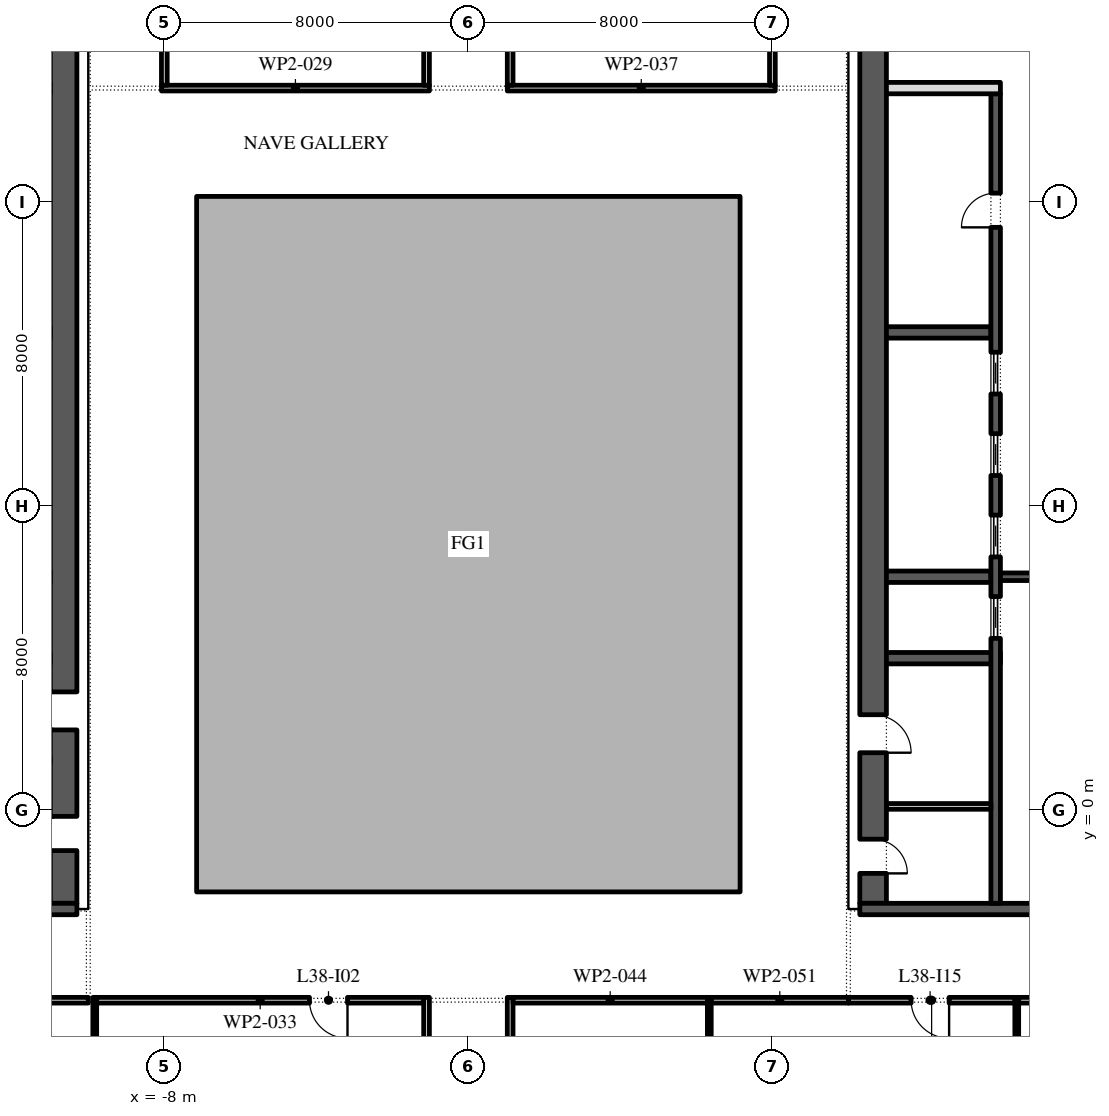
"""IFC4 building model, lengths in metres.
Left out: names, types, materials, properties, quantities, classifications, styles, units other than length and angle.
Written with IfcOpenShell. Run it as: python <this file> out.ifc"""

import sys

from ifc_helpers import new_model, si_unit, direction, frame, frame_2d, origin, place, context, subcontext, project, spatial, polyline, rectangle, outline, extrude, element, fill, save


model = new_model("IFC4")
c1 = context("Model", 3, precision=1e-05, world=origin(), true_north=direction((0.0, 1.0)))
c2 = subcontext(c1, "Body", "Model", "MODEL_VIEW")
j1 = project(units=[si_unit("LENGTHUNIT", "METRE"), si_unit("PLANEANGLEUNIT", "RADIAN")], contexts=[c1])
p1 = place(None, origin())
s1 = spatial("IfcSite", under=j1, at=p1, CompositionType="ELEMENT")
p2 = place(p1, origin())
s2 = spatial("IfcBuilding", under=s1, at=p2, CompositionType="ELEMENT")
p3 = place(p2, frame((0.0, 0.0, 175.8)))
s3 = spatial("IfcBuildingStorey", under=s2, at=p3, CompositionType="ELEMENT", Elevation=175.8)
p4 = place(p3, origin())
e1 = element("IfcWall", 1, at=p4, inside=s3, PredefinedType="STANDARD", context=c2, shape_type="SweptSolid", body=[
    extrude(outline(polyline([(-7.15, -2.15), (7.15, -2.15), (7.15, 16.15), (-7.15, 16.15), (-7.15, -2.15)]), holes=[polyline([(-7.0, -2.0), (-7.0, 16.0), (7.0, 16.0), (7.0, -2.0), (-7.0, -2.0)])]), origin(), (0.0, 0.0, 1.0), 4.0),
])
p5 = place(p3, frame((-10.65, -2.45, 0.0), z_axis=(0.0, 0.0, 1.0), x_axis=(0.0, 1.0, 0.0)))
e2 = element("IfcWall", 2, at=p5, inside=s3, PredefinedType="SHEAR", context=c2, shape_type="SweptSolid", body=[
    extrude(rectangle(XDim=27.9, YDim=0.7, at=frame_2d((13.95, 0.0))), origin(), (0.0, 0.0, 1.0), 4.0),
])
p6 = place(p5, frame((23.65, 0.0, 0.0)))
e3 = element("IfcOpeningElement", 3, at=p6, cuts=e2, PredefinedType="OPENING", context=c2, shape_type="SweptSolid", body=[
    extrude(rectangle(XDim=2.4, YDim=2.1, at=frame_2d((1.2, 1.05))), frame((0.0, 0.36, 0.0), z_axis=(0.0, -1.0, 0.0), x_axis=(1.0, 0.0, 0.0)), (0.0, 0.0, 1.0), 0.72),
])
p7 = place(p5, frame((1.387, 0.0, 0.0)))
e4 = element("IfcOpeningElement", 4, at=p7, cuts=e2, PredefinedType="OPENING", context=c2, shape_type="SweptSolid", body=[
    extrude(rectangle(XDim=0.9, YDim=2.1, at=frame_2d((0.45, 1.05))), frame((0.0, 0.36, 0.0), z_axis=(0.0, -1.0, 0.0), x_axis=(1.0, 0.0, 0.0)), (0.0, 0.0, 1.0), 0.72),
])
p8 = place(p5, frame((4.562, 0.0, 0.0)))
e5 = element("IfcOpeningElement", 5, at=p8, cuts=e2, PredefinedType="OPENING", context=c2, shape_type="SweptSolid", body=[
    extrude(rectangle(XDim=1.0, YDim=2.1, at=frame_2d((0.5, 1.05))), frame((0.0, 0.36, 0.0), z_axis=(0.0, -1.0, 0.0), x_axis=(1.0, 0.0, 0.0)), (0.0, 0.0, 1.0), 0.72),
])
p9 = place(p3, frame((-21.7, -2.6, 0.0), z_axis=(0.0, 0.0, 1.0), x_axis=(1.0, 0.0, 0.0)))
e6 = element("IfcWall", 6, at=p9, inside=s3, PredefinedType="SHEAR", context=c2, shape_type="SweptSolid", body=[
    extrude(rectangle(XDim=11.4, YDim=0.3, at=frame_2d((5.7, 0.0))), origin(), (0.0, 0.0, 1.0), 4.0),
])
p10 = place(p3, frame((10.65, -2.45, 0.0), z_axis=(0.0, 0.0, 1.0), x_axis=(0.0, 1.0, 0.0)))
e7 = element("IfcWall", 7, at=p10, inside=s3, PredefinedType="SHEAR", context=c2, shape_type="SweptSolid", body=[
    extrude(rectangle(XDim=27.9, YDim=0.7, at=frame_2d((13.95, 0.0))), origin(), (0.0, 0.0, 1.0), 4.0),
])
p11 = place(p10, frame((23.65, 0.0, 0.0)))
e8 = element("IfcOpeningElement", 8, at=p11, cuts=e7, PredefinedType="OPENING", context=c2, shape_type="SweptSolid", body=[
    extrude(rectangle(XDim=2.4, YDim=2.1, at=frame_2d((1.2, 1.05))), frame((0.0, 0.36, 0.0), z_axis=(0.0, -1.0, 0.0), x_axis=(1.0, 0.0, 0.0)), (0.0, 0.0, 1.0), 0.72),
])
p12 = place(p10, frame((0.788, 0.0, 0.0)))
e9 = element("IfcOpeningElement", 9, at=p12, cuts=e7, PredefinedType="OPENING", context=c2, shape_type="SweptSolid", body=[
    extrude(rectangle(XDim=0.9, YDim=2.1, at=frame_2d((0.45, 1.05))), frame((0.0, 0.36, 0.0), z_axis=(0.0, -1.0, 0.0), x_axis=(1.0, 0.0, 0.0)), (0.0, 0.0, 1.0), 0.72),
])
p13 = place(p10, frame((3.962, 0.0, 0.0)))
e10 = element("IfcOpeningElement", 10, at=p13, cuts=e7, PredefinedType="OPENING", context=c2, shape_type="SweptSolid", body=[
    extrude(rectangle(XDim=1.0, YDim=2.1, at=frame_2d((0.5, 1.05))), frame((0.0, 0.36, 0.0), z_axis=(0.0, -1.0, 0.0), x_axis=(1.0, 0.0, 0.0)), (0.0, 0.0, 1.0), 0.72),
])
p14 = place(p3, frame((10.3, -2.6, 0.0), z_axis=(0.0, 0.0, 1.0), x_axis=(1.0, 0.0, 0.0)))
e11 = element("IfcWall", 11, at=p14, inside=s3, PredefinedType="SHEAR", context=c2, shape_type="SweptSolid", body=[
    extrude(rectangle(XDim=11.4, YDim=0.3, at=frame_2d((5.7, 0.0))), origin(), (0.0, 0.0, 1.0), 4.0),
])
p15 = place(p3, frame((11.0, 4.0, 0.0), z_axis=(0.0, 0.0, 1.0), x_axis=(1.0, 0.0, 0.0)))
e12 = element("IfcWall", 12, at=p15, inside=s3, PredefinedType="SHEAR", context=c2, shape_type="SweptSolid", body=[
    extrude(rectangle(XDim=3.0, YDim=0.3, at=frame_2d((1.5, 0.0))), origin(), (0.0, 0.0, 1.0), 4.0),
])
for number, where, z_axis, x_axis in (
    (13, (11.0, 6.143, 0.0), (0.0, 0.0, 1.0), (1.0, 0.0, 0.0)),
    (14, (11.0, 12.571, 0.0), (0.0, 0.0, 1.0), (1.0, 0.0, 0.0)),
):
    element("IfcWall", number, at=place(p3, frame(where, z_axis=z_axis, x_axis=x_axis)), inside=s3, PredefinedType="SHEAR", context=c2, shape_type="SweptSolid", body=[
        extrude(rectangle(XDim=2.75, YDim=0.3, at=frame_2d((1.375, 0.0))), origin(), (0.0, 0.0, 1.0), 4.0),
    ])
p16 = place(p3, frame((13.875, -2.45, 0.0), z_axis=(0.0, 0.0, 1.0), x_axis=(0.0, 1.0, 0.0)))
e15 = element("IfcWall", 15, at=p16, inside=s3, PredefinedType="SHEAR", context=c2, shape_type="SweptSolid", body=[
    extrude(rectangle(XDim=21.3, YDim=0.25, at=frame_2d((10.65, 0.0))), origin(), (0.0, 0.0, 1.0), 4.0),
])
p17 = place(p16, frame((17.786, 0.0, 0.0)))
e16 = element("IfcOpeningElement", 16, at=p17, cuts=e15, PredefinedType="OPENING", context=c2, shape_type="SweptSolid", body=[
    extrude(rectangle(XDim=0.9, YDim=2.1, at=frame_2d((0.45, 1.05))), frame((0.0, 0.135, 0.0), z_axis=(0.0, -1.0, 0.0), x_axis=(1.0, 0.0, 0.0)), (0.0, 0.0, 1.0), 0.27),
])
p18 = place(p16, frame((6.971, 0.0, 0.0)))
e17 = element("IfcOpeningElement", 17, at=p18, cuts=e15, PredefinedType="OPENING", context=c2, shape_type="SweptSolid", body=[
    extrude(rectangle(XDim=1.1, YDim=2.1, at=frame_2d((0.55, 1.05))), frame((0.0, 0.135, 0.0), z_axis=(0.0, -1.0, 0.0), x_axis=(1.0, 0.0, 0.0)), (0.0, 0.0, 1.0), 0.27),
])
p19 = place(p16, frame((9.114, 0.0, 0.0)))
e18 = element("IfcOpeningElement", 18, at=p19, cuts=e15, PredefinedType="OPENING", context=c2, shape_type="SweptSolid", body=[
    extrude(rectangle(XDim=1.1, YDim=2.1, at=frame_2d((0.55, 1.05))), frame((0.0, 0.135, 0.0), z_axis=(0.0, -1.0, 0.0), x_axis=(1.0, 0.0, 0.0)), (0.0, 0.0, 1.0), 0.27),
])
p20 = place(p16, frame((11.257, 0.0, 0.0)))
e19 = element("IfcOpeningElement", 19, at=p20, cuts=e15, PredefinedType="OPENING", context=c2, shape_type="SweptSolid", body=[
    extrude(rectangle(XDim=1.1, YDim=2.1, at=frame_2d((0.55, 1.05))), frame((0.0, 0.135, 0.0), z_axis=(0.0, -1.0, 0.0), x_axis=(1.0, 0.0, 0.0)), (0.0, 0.0, 1.0), 0.27),
])
p21 = place(p16, frame((13.4, 0.0, 0.0)))
e20 = element("IfcOpeningElement", 20, at=p21, cuts=e15, PredefinedType="OPENING", context=c2, shape_type="SweptSolid", body=[
    extrude(rectangle(XDim=1.1, YDim=2.1, at=frame_2d((0.55, 1.05))), frame((0.0, 0.135, 0.0), z_axis=(0.0, -1.0, 0.0), x_axis=(1.0, 0.0, 0.0)), (0.0, 0.0, 1.0), 0.27),
])
p22 = place(p3, frame((11.0, 19.0, 0.0), z_axis=(0.0, 0.0, 1.0), x_axis=(1.0, 0.0, 0.0)))
e21 = element("IfcWall", 21, at=p22, inside=s3, PredefinedType="PARTITIONING", context=c2, shape_type="SweptSolid", body=[
    extrude(rectangle(XDim=3.0, YDim=0.3, at=frame_2d((1.5, 0.0))), origin(), (0.0, 0.0, 1.0), 4.0),
])
p23 = place(p3, frame((14.0, 6.143, 0.0), z_axis=(0.0, 0.0, 1.0), x_axis=(1.0, 0.0, 0.0)))
e22 = element("IfcWall", 22, at=p23, inside=s3, PredefinedType="SHEAR", context=c2, shape_type="SweptSolid", body=[
    extrude(rectangle(XDim=4.0, YDim=0.2, at=frame_2d((2.0, 0.0))), origin(), (0.0, 0.0, 1.0), 4.0),
])
p24 = place(p23, frame((1.4, 0.0, 0.0)))
e23 = element("IfcOpeningElement", 23, at=p24, cuts=e22, PredefinedType="OPENING", context=c2, shape_type="SweptSolid", body=[
    extrude(rectangle(XDim=1.2, YDim=2.1, at=frame_2d((0.6, 1.05))), frame((0.0, 0.11, 0.0), z_axis=(0.0, -1.0, 0.0), x_axis=(1.0, 0.0, 0.0)), (0.0, 0.0, 1.0), 0.22),
])
p25 = place(p3, frame((11.0, 0.1, 0.0), z_axis=(0.0, 0.0, 1.0), x_axis=(1.0, 0.0, 0.0)))
e24 = element("IfcWall", 24, at=p25, inside=s3, PredefinedType="PARTITIONING", context=c2, shape_type="SweptSolid", body=[
    extrude(rectangle(XDim=2.75, YDim=0.15, at=frame_2d((1.375, 0.0))), origin(), (0.0, 0.0, 1.0), 4.0),
])
p26 = place(p3, frame((-10.0, -5.0, 0.0), z_axis=(0.0, 0.0, 1.0), x_axis=(-1.0, 0.0, 0.0)))
e25 = element("IfcWall", 25, at=p26, inside=s3, PredefinedType="PARTITIONING", context=c2, shape_type="SweptSolid", body=[
    extrude(rectangle(XDim=13.925, YDim=0.15, at=frame_2d((6.962, 0.0))), origin(), (0.0, 0.0, 1.0), 4.0),
])
p27 = place(p26, frame((7.85, 0.0, 0.0)))
e26 = element("IfcOpeningElement", 26, at=p27, cuts=e25, PredefinedType="OPENING", context=c2, shape_type="SweptSolid", body=[
    extrude(rectangle(XDim=1.0, YDim=2.1, at=frame_2d((0.5, 1.05))), frame((0.0, 0.085, 0.0), z_axis=(0.0, -1.0, 0.0), x_axis=(1.0, 0.0, 0.0)), (0.0, 0.0, 1.0), 0.17),
])
p28 = place(p3, frame((-9.83, -11.12, 0.0), z_axis=(0.0, 0.0, 1.0), x_axis=(0.0, 1.0, 0.0)))
e27 = element("IfcWall", 27, at=p28, inside=s3, PredefinedType="PARTITIONING", context=c2, shape_type="SweptSolid", body=[
    extrude(rectangle(XDim=6.195, YDim=0.1, at=frame_2d((3.098, 0.0))), origin(), (0.0, 0.0, 1.0), 4.0),
])
p29 = place(p3, frame((-8.075, 19.0, 0.0), z_axis=(0.0, 0.0, 1.0), x_axis=(1.0, 0.0, 0.0)))
e28 = element("IfcWall", 28, at=p29, inside=s3, PredefinedType="PARTITIONING", context=c2, shape_type="SweptSolid", body=[
    extrude(rectangle(XDim=7.05, YDim=0.15, at=frame_2d((3.525, 0.0))), origin(), (0.0, 0.0, 1.0), 4.0),
])
p30 = place(p3, frame((-8.0, 27.325, 0.0), z_axis=(0.0, 0.0, 1.0), x_axis=(0.0, -1.0, 0.0)))
e29 = element("IfcWall", 29, at=p30, inside=s3, PredefinedType="PARTITIONING", context=c2, shape_type="SweptSolid", body=[
    extrude(rectangle(XDim=8.25, YDim=0.15, at=frame_2d((4.125, 0.0))), origin(), (0.0, 0.0, 1.0), 4.0),
])
p31 = place(p3, frame((-1.1, -11.12, 0.0), z_axis=(0.0, 0.0, 1.0), x_axis=(0.0, 1.0, 0.0)))
e30 = element("IfcWall", 30, at=p31, inside=s3, PredefinedType="PARTITIONING", context=c2, shape_type="SweptSolid", body=[
    extrude(rectangle(XDim=6.195, YDim=0.15, at=frame_2d((3.098, 0.0))), origin(), (0.0, 0.0, 1.0), 4.0),
])
p32 = place(p3, frame((-1.175, -5.0, 0.0), z_axis=(0.0, 0.0, 1.0), x_axis=(-1.0, 0.0, 0.0)))
e31 = element("IfcWall", 31, at=p32, inside=s3, PredefinedType="PARTITIONING", context=c2, shape_type="SweptSolid", body=[
    extrude(rectangle(XDim=8.605, YDim=0.15, at=frame_2d((4.302, 0.0))), origin(), (0.0, 0.0, 1.0), 4.0),
])
p33 = place(p32, frame((2.005, 0.0, 0.0)))
e32 = element("IfcOpeningElement", 32, at=p33, cuts=e31, PredefinedType="OPENING", context=c2, shape_type="SweptSolid", body=[
    extrude(rectangle(XDim=1.0, YDim=2.1, at=frame_2d((0.5, 1.05))), frame((0.0, 0.085, 0.0), z_axis=(0.0, -1.0, 0.0), x_axis=(1.0, 0.0, 0.0)), (0.0, 0.0, 1.0), 0.17),
])
p34 = place(p3, frame((-1.1, 19.075, 0.0), z_axis=(0.0, 0.0, 1.0), x_axis=(0.0, 1.0, 0.0)))
e33 = element("IfcWall", 33, at=p34, inside=s3, PredefinedType="PARTITIONING", context=c2, shape_type="SweptSolid", body=[
    extrude(rectangle(XDim=11.295, YDim=0.15, at=frame_2d((5.647, 0.0))), origin(), (0.0, 0.0, 1.0), 4.0),
])
p35 = place(p34, frame((6.195, 0.0, 0.0)))
e34 = element("IfcOpeningElement", 34, at=p35, cuts=e33, PredefinedType="OPENING", context=c2, shape_type="SweptSolid", body=[
    extrude(rectangle(XDim=1.0, YDim=2.1, at=frame_2d((0.5, 1.05))), frame((0.0, 0.085, 0.0), z_axis=(0.0, -1.0, 0.0), x_axis=(1.0, 0.0, 0.0)), (0.0, 0.0, 1.0), 0.17),
])
p36 = place(p3, frame((1.1, -4.925, 0.0), z_axis=(0.0, 0.0, 1.0), x_axis=(0.0, -1.0, 0.0)))
e35 = element("IfcWall", 35, at=p36, inside=s3, PredefinedType="PARTITIONING", context=c2, shape_type="SweptSolid", body=[
    extrude(rectangle(XDim=11.345, YDim=0.15, at=frame_2d((5.672, 0.0))), origin(), (0.0, 0.0, 1.0), 4.0),
])
p37 = place(p36, frame((7.675, 0.0, 0.0)))
e36 = element("IfcOpeningElement", 36, at=p37, cuts=e35, PredefinedType="OPENING", context=c2, shape_type="SweptSolid", body=[
    extrude(rectangle(XDim=1.0, YDim=2.1, at=frame_2d((0.5, 1.05))), frame((0.0, 0.085, 0.0), z_axis=(0.0, -1.0, 0.0), x_axis=(1.0, 0.0, 0.0)), (0.0, 0.0, 1.0), 0.17),
])
p38 = place(p3, frame((1.025, 19.0, 0.0), z_axis=(0.0, 0.0, 1.0), x_axis=(1.0, 0.0, 0.0)))
e37 = element("IfcWall", 37, at=p38, inside=s3, PredefinedType="PARTITIONING", context=c2, shape_type="SweptSolid", body=[
    extrude(rectangle(XDim=7.05, YDim=0.15, at=frame_2d((3.525, 0.0))), origin(), (0.0, 0.0, 1.0), 4.0),
])
p39 = place(p3, frame((1.1, 30.47, 0.0), z_axis=(0.0, 0.0, 1.0), x_axis=(0.0, -1.0, 0.0)))
e38 = element("IfcWall", 38, at=p39, inside=s3, PredefinedType="PARTITIONING", context=c2, shape_type="SweptSolid", body=[
    extrude(rectangle(XDim=11.395, YDim=0.15, at=frame_2d((5.698, 0.0))), origin(), (0.0, 0.0, 1.0), 4.0),
])
p40 = place(p39, frame((4.07, 0.0, 0.0)))
e39 = element("IfcOpeningElement", 39, at=p40, cuts=e38, PredefinedType="OPENING", context=c2, shape_type="SweptSolid", body=[
    extrude(rectangle(XDim=1.0, YDim=2.1, at=frame_2d((0.5, 1.05))), frame((0.0, 0.085, 0.0), z_axis=(0.0, -1.0, 0.0), x_axis=(1.0, 0.0, 0.0)), (0.0, 0.0, 1.0), 0.17),
])
p41 = place(p3, frame((6.34, -15.061, 0.0), z_axis=(0.0, 0.0, 1.0), x_axis=(0.0, 1.0, 0.0)))
e40 = element("IfcWall", 40, at=p41, inside=s3, PredefinedType="PARTITIONING", context=c2, shape_type="SweptSolid", body=[
    extrude(rectangle(XDim=10.136, YDim=0.1, at=frame_2d((5.068, 0.0))), origin(), (0.0, 0.0, 1.0), 4.0),
])
p42 = place(p3, frame((6.29, -5.0, 0.0), z_axis=(0.0, 0.0, 1.0), x_axis=(-1.0, 0.0, 0.0)))
e41 = element("IfcWall", 41, at=p42, inside=s3, PredefinedType="PARTITIONING", context=c2, shape_type="SweptSolid", body=[
    extrude(rectangle(XDim=5.115, YDim=0.15, at=frame_2d((2.558, 0.0))), origin(), (0.0, 0.0, 1.0), 4.0),
])
p43 = place(p3, frame((8.0, 19.075, 0.0), z_axis=(0.0, 0.0, 1.0), x_axis=(0.0, 1.0, 0.0)))
e42 = element("IfcWall", 42, at=p43, inside=s3, PredefinedType="PARTITIONING", context=c2, shape_type="SweptSolid", body=[
    extrude(rectangle(XDim=8.4, YDim=0.15, at=frame_2d((4.2, 0.0))), origin(), (0.0, 0.0, 1.0), 4.0),
])
p44 = place(p3, frame((10.0, -5.0, 0.0), z_axis=(0.0, 0.0, 1.0), x_axis=(-1.0, 0.0, 0.0)))
e43 = element("IfcWall", 43, at=p44, inside=s3, PredefinedType="PARTITIONING", context=c2, shape_type="SweptSolid", body=[
    extrude(rectangle(XDim=3.61, YDim=0.15, at=frame_2d((1.805, 0.0))), origin(), (0.0, 0.0, 1.0), 4.0),
])
p45 = place(p3, frame((14.43, -13.193, 0.0), z_axis=(0.0, 0.0, 1.0), x_axis=(0.0, 1.0, 0.0)))
e44 = element("IfcWall", 44, at=p45, inside=s3, PredefinedType="PARTITIONING", context=c2, shape_type="SweptSolid", body=[
    extrude(rectangle(XDim=8.268, YDim=0.1, at=frame_2d((4.134, 0.0))), origin(), (0.0, 0.0, 1.0), 4.0),
])
p46 = place(p3, frame((14.38, -5.0, 0.0), z_axis=(0.0, 0.0, 1.0), x_axis=(-1.0, 0.0, 0.0)))
e45 = element("IfcWall", 45, at=p46, inside=s3, PredefinedType="PARTITIONING", context=c2, shape_type="SweptSolid", body=[
    extrude(rectangle(XDim=4.38, YDim=0.15, at=frame_2d((2.19, 0.0))), origin(), (0.0, 0.0, 1.0), 4.0),
])
p47 = place(p46, frame((1.73, 0.0, 0.0)))
e46 = element("IfcOpeningElement", 46, at=p47, cuts=e45, PredefinedType="OPENING", context=c2, shape_type="SweptSolid", body=[
    extrude(rectangle(XDim=1.0, YDim=2.1, at=frame_2d((0.5, 1.05))), frame((0.0, 0.085, 0.0), z_axis=(0.0, -1.0, 0.0), x_axis=(1.0, 0.0, 0.0)), (0.0, 0.0, 1.0), 0.17),
])
p48 = place(p3, frame((17.97, -5.0, 0.0), z_axis=(0.0, 0.0, 1.0), x_axis=(-1.0, 0.0, 0.0)))
e47 = element("IfcWall", 47, at=p48, inside=s3, PredefinedType="PARTITIONING", context=c2, shape_type="SweptSolid", body=[
    extrude(rectangle(XDim=3.49, YDim=0.15, at=frame_2d((1.745, 0.0))), origin(), (0.0, 0.0, 1.0), 4.0),
])
p49 = place(p48, frame((1.39, 0.0, 0.0)))
e48 = element("IfcOpeningElement", 48, at=p49, cuts=e47, PredefinedType="OPENING", context=c2, shape_type="SweptSolid", body=[
    extrude(rectangle(XDim=1.0, YDim=2.1, at=frame_2d((0.5, 1.05))), frame((0.0, 0.085, 0.0), z_axis=(0.0, -1.0, 0.0), x_axis=(1.0, 0.0, 0.0)), (0.0, 0.0, 1.0), 0.17),
])
p50 = place(p17, origin())
e49 = element("IfcDoor", 49, at=p50, inside=s3, OperationType="SINGLE_SWING_RIGHT", PredefinedType="DOOR", context=c2, shape_type="SweptSolid", body=[
    extrude(rectangle(XDim=0.9, YDim=2.1, at=frame_2d((0.45, 1.05))), frame((0.0, 0.125, 0.0), z_axis=(0.0, -1.0, 0.0), x_axis=(1.0, 0.0, 0.0)), (0.0, 0.0, 1.0), 0.05),
])
fill(e16, e49)
p51 = place(p18, origin())
e50 = element("IfcDoor", 50, at=p51, inside=s3, OperationType="SLIDING_TO_LEFT", PredefinedType="DOOR", context=c2, shape_type="SweptSolid", body=[
    extrude(rectangle(XDim=1.1, YDim=2.1, at=frame_2d((0.55, 1.05))), frame((0.0, 0.025, 0.0), z_axis=(0.0, -1.0, 0.0), x_axis=(1.0, 0.0, 0.0)), (0.0, 0.0, 1.0), 0.05),
])
fill(e17, e50)
p52 = place(p19, origin())
e51 = element("IfcDoor", 51, at=p52, inside=s3, OperationType="SLIDING_TO_LEFT", PredefinedType="DOOR", context=c2, shape_type="SweptSolid", body=[
    extrude(rectangle(XDim=1.1, YDim=2.1, at=frame_2d((0.55, 1.05))), frame((0.0, 0.025, 0.0), z_axis=(0.0, -1.0, 0.0), x_axis=(1.0, 0.0, 0.0)), (0.0, 0.0, 1.0), 0.05),
])
fill(e18, e51)
p53 = place(p20, origin())
e52 = element("IfcDoor", 52, at=p53, inside=s3, OperationType="SLIDING_TO_LEFT", PredefinedType="DOOR", context=c2, shape_type="SweptSolid", body=[
    extrude(rectangle(XDim=1.1, YDim=2.1, at=frame_2d((0.55, 1.05))), frame((0.0, 0.025, 0.0), z_axis=(0.0, -1.0, 0.0), x_axis=(1.0, 0.0, 0.0)), (0.0, 0.0, 1.0), 0.05),
])
fill(e19, e52)
p54 = place(p21, origin())
e53 = element("IfcDoor", 53, at=p54, inside=s3, OperationType="SLIDING_TO_LEFT", PredefinedType="DOOR", context=c2, shape_type="SweptSolid", body=[
    extrude(rectangle(XDim=1.1, YDim=2.1, at=frame_2d((0.55, 1.05))), frame((0.0, 0.025, 0.0), z_axis=(0.0, -1.0, 0.0), x_axis=(1.0, 0.0, 0.0)), (0.0, 0.0, 1.0), 0.05),
])
fill(e20, e53)
p55 = place(p12, frame((0.9, -0.65, 0.0), z_axis=(0.0, 0.0, 1.0), x_axis=(-1.0, 0.0, 0.0)))
e54 = element("IfcDoor", 54, at=p55, inside=s3, OperationType="SINGLE_SWING_LEFT", PredefinedType="DOOR", context=c2, shape_type="SweptSolid", body=[
    extrude(rectangle(XDim=0.9, YDim=2.1, at=frame_2d((0.45, 1.05))), frame((0.0, -0.3, 0.0), z_axis=(0.0, -1.0, 0.0), x_axis=(1.0, 0.0, 0.0)), (0.0, 0.0, 1.0), 0.05),
])
fill(e9, e54)
p56 = place(p13, frame((1.0, -0.65, 0.0), z_axis=(0.0, 0.0, 1.0), x_axis=(-1.0, 0.0, 0.0)))
e55 = element("IfcDoor", 55, at=p56, inside=s3, OperationType="SINGLE_SWING_LEFT", PredefinedType="DOOR", context=c2, shape_type="SweptSolid", body=[
    extrude(rectangle(XDim=1.0, YDim=2.1, at=frame_2d((0.5, 1.05))), frame((0.0, -0.3, 0.0), z_axis=(0.0, -1.0, 0.0), x_axis=(1.0, 0.0, 0.0)), (0.0, 0.0, 1.0), 0.05),
])
fill(e10, e55)
p57 = place(p33, origin())
e56 = element("IfcDoor", 56, at=p57, inside=s3, OperationType="SINGLE_SWING_RIGHT", PredefinedType="DOOR", context=c2, shape_type="SweptSolid", body=[
    extrude(rectangle(XDim=1.0, YDim=2.1, at=frame_2d((0.5, 1.05))), frame((0.0, 0.025, 0.0), z_axis=(0.0, -1.0, 0.0), x_axis=(1.0, 0.0, 0.0)), (0.0, 0.0, 1.0), 0.05),
])
fill(e32, e56)
p58 = place(p47, origin())
e57 = element("IfcDoor", 57, at=p58, inside=s3, OperationType="SINGLE_SWING_RIGHT", PredefinedType="DOOR", context=c2, shape_type="SweptSolid", body=[
    extrude(rectangle(XDim=1.0, YDim=2.1, at=frame_2d((0.5, 1.05))), frame((0.0, 0.025, 0.0), z_axis=(0.0, -1.0, 0.0), x_axis=(1.0, 0.0, 0.0)), (0.0, 0.0, 1.0), 0.05),
])
fill(e46, e57)
save(model, sys.argv[1])
